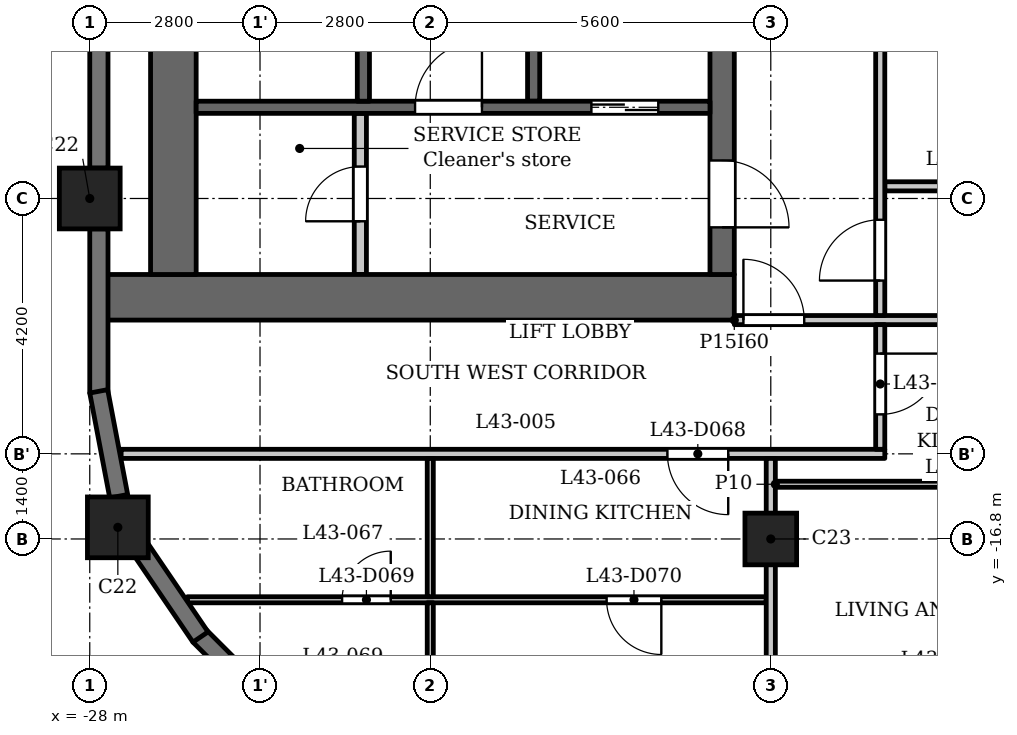
"""IFC4 building model, lengths in metres.
Left out: names, types, materials, properties, quantities, classifications, styles, units other than length and angle.
Written with IfcOpenShell. Run it as: python <this file> out.ifc"""

import sys

from ifc_helpers import new_model, si_unit, direction, frame, frame_2d, origin, origin_2d, place, context, subcontext, project, spatial, rectangle, extrude, element, fill, save


model = new_model("IFC4")
c1 = context("Model", 3, precision=1e-05, world=origin(), true_north=direction((0.0, 1.0)))
c2 = subcontext(c1, "Body", "Model", "MODEL_VIEW")
j1 = project(units=[si_unit("LENGTHUNIT", "METRE"), si_unit("PLANEANGLEUNIT", "RADIAN")], contexts=[c1])
p1 = place(None, origin())
s1 = spatial("IfcSite", under=j1, at=p1, CompositionType="ELEMENT")
p2 = place(p1, origin())
s2 = spatial("IfcBuilding", under=s1, at=p2, CompositionType="ELEMENT")
p3 = place(p2, frame((0.0, 0.0, 167.6)))
s3 = spatial("IfcBuildingStorey", under=s2, at=p3, CompositionType="ELEMENT", Elevation=167.6)
for number, where, z_axis, x_axis in (
    (1, (-28.0, -11.2, 0.0), (0.0, 0.0, 1.0), (1.0, 0.0, 0.0)),
    (2, (-27.538, -16.609, 0.0), (0.0, 0.0, 1.0), (1.0, 0.0, 0.0)),
):
    element("IfcColumn", number, at=place(p3, frame(where, z_axis=z_axis, x_axis=x_axis)), inside=s3, PredefinedType="COLUMN", context=c2, shape_type="SweptSolid", body=[
        extrude(rectangle(XDim=1.0, YDim=1.0, at=origin_2d()), origin(), (0.0, 0.0, 1.0), 3.5),
    ])
p4 = place(p3, frame((-16.8, -16.8, 0.0), z_axis=(0.0, 0.0, 1.0), x_axis=(1.0, 0.0, 0.0)))
e3 = element("IfcColumn", 3, at=p4, inside=s3, PredefinedType="COLUMN", context=c2, shape_type="SweptSolid", body=[
    extrude(rectangle(XDim=0.85, YDim=0.85, at=origin_2d()), origin(), (0.0, 0.0, 1.0), 3.5),
])
p5 = place(p3, frame((-26.197, -18.391, 0.0), z_axis=(0.0, 0.0, 1.0), x_axis=(0.707061571201, -0.707151988282, 0.0)))
e4 = element("IfcWall", 4, at=p5, inside=s3, PredefinedType="SOLIDWALL", context=c2, shape_type="SweptSolid", body=[
    extrude(rectangle(XDim=2.7, YDim=0.3, at=frame_2d((1.35, 0.0))), origin(), (0.0, 0.0, 1.0), 2.45),
])
p6 = place(p5, frame((0.75, 0.0, 0.6)))
e5 = element("IfcOpeningElement", 5, at=p6, cuts=e4, PredefinedType="OPENING", context=c2, shape_type="SweptSolid", body=[
    extrude(rectangle(XDim=1.2, YDim=1.55, at=frame_2d((0.6, 0.775))), frame((0.0, 0.16, 0.0), z_axis=(0.0, -1.0, 0.0), x_axis=(1.0, 0.0, 0.0)), (0.0, 0.0, 1.0), 0.32),
])
p7 = place(p3, frame((-27.85, -6.1, 0.0), z_axis=(0.0, 0.0, 1.0), x_axis=(0.0, -1.0, 0.0)))
e6 = element("IfcWall", 6, at=p7, inside=s3, PredefinedType="SOLIDWALL", context=c2, shape_type="SweptSolid", body=[
    extrude(rectangle(XDim=4.6, YDim=0.3, at=frame_2d((2.3, 0.0))), origin(), (0.0, 0.0, 1.0), 2.45),
])
p8 = place(p3, frame((-27.85, -11.7, 0.0), z_axis=(0.0, 0.0, 1.0), x_axis=(0.0, -1.0, 0.0)))
e7 = element("IfcWall", 7, at=p8, inside=s3, PredefinedType="SOLIDWALL", context=c2, shape_type="SweptSolid", body=[
    extrude(rectangle(XDim=2.7, YDim=0.3, at=frame_2d((1.35, 0.0))), origin(), (0.0, 0.0, 1.0), 2.45),
])
for number, where, z_axis, x_axis in (
    (8, (-27.853, -14.372, 0.0), (0.0, 0.0, 1.0), (0.187, -0.982, 0.0)),
    (9, (-27.166, -16.96, 0.0), (0.0, 0.0, 1.0), (0.562, -0.827, 0.0)),
):
    element("IfcWall", number, at=place(p3, frame(where, z_axis=z_axis, x_axis=x_axis)), inside=s3, PredefinedType="SOLIDWALL", context=c2, shape_type="SweptSolid", body=[
        extrude(rectangle(XDim=1.756, YDim=0.3, at=frame_2d((0.878, 0.0))), origin(), (0.0, 0.0, 1.0), 2.45),
    ])
p9 = place(p3, frame((-20.7, -9.6, 0.0), z_axis=(0.0, 0.0, 1.0), x_axis=(0.0, 1.0, 0.0)))
e10 = element("IfcWall", 10, at=p9, inside=s3, PredefinedType="SHEAR", context=c2, shape_type="SweptSolid", body=[
    extrude(rectangle(XDim=9.75, YDim=0.2, at=frame_2d((4.875, 0.0))), origin(), (0.0, 0.0, 1.0), 3.2),
])
p10 = place(p3, frame((-17.4, -12.825, 0.0), z_axis=(0.0, 0.0, 1.0), x_axis=(-1.0, 0.0, 0.0)))
e11 = element("IfcWall", 11, at=p10, inside=s3, PredefinedType="SHEAR", context=c2, shape_type="SweptSolid", body=[
    extrude(rectangle(XDim=10.4, YDim=0.75, at=frame_2d((5.2, 0.0))), origin(), (0.0, 0.0, 1.0), 3.2),
])
p11 = place(p3, frame((-17.6, -12.45, 0.0), z_axis=(0.0, 0.0, 1.0), x_axis=(0.0, 1.0, 0.0)))
e12 = element("IfcWall", 12, at=p11, inside=s3, PredefinedType="SHEAR", context=c2, shape_type="SweptSolid", body=[
    extrude(rectangle(XDim=24.9, YDim=0.4, at=frame_2d((12.45, 0.0))), origin(), (0.0, 0.0, 1.0), 3.2),
])
p12 = place(p11, frame((8.65, 0.0, 0.0)))
e13 = element("IfcOpeningElement", 13, at=p12, cuts=e12, PredefinedType="OPENING", context=c2, shape_type="SweptSolid", body=[
    extrude(rectangle(XDim=0.9, YDim=2.1, at=frame_2d((0.45, 1.05))), frame((0.0, 0.21, 0.0), z_axis=(0.0, -1.0, 0.0), x_axis=(1.0, 0.0, 0.0)), (0.0, 0.0, 1.0), 0.42),
])
p13 = place(p11, frame((15.6, 0.0, 0.0)))
e14 = element("IfcOpeningElement", 14, at=p13, cuts=e12, PredefinedType="OPENING", context=c2, shape_type="SweptSolid", body=[
    extrude(rectangle(XDim=1.1, YDim=2.1, at=frame_2d((0.55, 1.05))), frame((0.0, 0.21, 0.0), z_axis=(0.0, -1.0, 0.0), x_axis=(1.0, 0.0, 0.0)), (0.0, 0.0, 1.0), 0.42),
])
p14 = place(p11, frame((18.0, 0.0, 0.0)))
e15 = element("IfcOpeningElement", 15, at=p14, cuts=e12, PredefinedType="OPENING", context=c2, shape_type="SweptSolid", body=[
    extrude(rectangle(XDim=1.1, YDim=2.1, at=frame_2d((0.55, 1.05))), frame((0.0, 0.21, 0.0), z_axis=(0.0, -1.0, 0.0), x_axis=(1.0, 0.0, 0.0)), (0.0, 0.0, 1.0), 0.42),
])
p15 = place(p11, frame((23.025, 0.0, 0.0)))
e16 = element("IfcOpeningElement", 16, at=p15, cuts=e12, PredefinedType="OPENING", context=c2, shape_type="SweptSolid", body=[
    extrude(rectangle(XDim=1.1, YDim=2.1, at=frame_2d((0.55, 1.05))), frame((0.0, 0.21, 0.0), z_axis=(0.0, -1.0, 0.0), x_axis=(1.0, 0.0, 0.0)), (0.0, 0.0, 1.0), 0.42),
])
p16 = place(p11, frame((0.775, 0.0, 0.0)))
e17 = element("IfcOpeningElement", 17, at=p16, cuts=e12, PredefinedType="OPENING", context=c2, shape_type="SweptSolid", body=[
    extrude(rectangle(XDim=1.1, YDim=2.1, at=frame_2d((0.55, 1.05))), frame((0.0, 0.21, 0.0), z_axis=(0.0, -1.0, 0.0), x_axis=(1.0, 0.0, 0.0)), (0.0, 0.0, 1.0), 0.42),
])
p17 = place(p11, frame((12.925, 0.0, 0.0)))
e18 = element("IfcOpeningElement", 18, at=p17, cuts=e12, PredefinedType="OPENING", context=c2, shape_type="SweptSolid", body=[
    extrude(rectangle(XDim=1.8, YDim=2.1, at=frame_2d((0.9, 1.05))), frame((0.0, 0.21, 0.0), z_axis=(0.0, -1.0, 0.0), x_axis=(1.0, 0.0, 0.0)), (0.0, 0.0, 1.0), 0.42),
])
p18 = place(p3, frame((-26.625, -12.45, 0.0), z_axis=(0.0, 0.0, 1.0), x_axis=(0.0, 1.0, 0.0)))
e19 = element("IfcWall", 19, at=p18, inside=s3, PredefinedType="SHEAR", context=c2, shape_type="SweptSolid", body=[
    extrude(rectangle(XDim=24.9, YDim=0.75, at=frame_2d((12.45, 0.0))), origin(), (0.0, 0.0, 1.0), 3.2),
])
p19 = place(p3, frame((-23.55, -12.45, 0.0), z_axis=(0.0, 0.0, 1.0), x_axis=(0.0, 1.0, 0.0)))
e20 = element("IfcWall", 20, at=p19, inside=s3, PredefinedType="PARTITIONING", context=c2, shape_type="SweptSolid", body=[
    extrude(rectangle(XDim=2.65, YDim=0.2, at=frame_2d((1.325, 0.0))), origin(), (0.0, 0.0, 1.0), 3.2),
])
p20 = place(p19, frame((0.875, 0.0, 0.0)))
e21 = element("IfcOpeningElement", 21, at=p20, cuts=e20, PredefinedType="OPENING", context=c2, shape_type="SweptSolid", body=[
    extrude(rectangle(XDim=0.9, YDim=2.1, at=frame_2d((0.45, 1.05))), frame((0.0, 0.11, 0.0), z_axis=(0.0, -1.0, 0.0), x_axis=(1.0, 0.0, 0.0)), (0.0, 0.0, 1.0), 0.22),
])
p21 = place(p3, frame((-17.8, -9.7, 0.0), z_axis=(0.0, 0.0, 1.0), x_axis=(-1.0, 0.0, 0.0)))
e22 = element("IfcWall", 22, at=p21, inside=s3, PredefinedType="SHEAR", context=c2, shape_type="SweptSolid", body=[
    extrude(rectangle(XDim=8.45, YDim=0.2, at=frame_2d((4.225, 0.0))), origin(), (0.0, 0.0, 1.0), 3.2),
])
p22 = place(p21, frame((0.85, 0.0, 0.0)))
e23 = element("IfcOpeningElement", 23, at=p22, cuts=e22, PredefinedType="OPENING", context=c2, shape_type="SweptSolid", body=[
    extrude(rectangle(XDim=1.1, YDim=2.1, at=frame_2d((0.55, 1.05))), frame((0.0, 0.11, 0.0), z_axis=(0.0, -1.0, 0.0), x_axis=(1.0, 0.0, 0.0)), (0.0, 0.0, 1.0), 0.22),
])
p23 = place(p21, frame((3.75, 0.0, 0.0)))
e24 = element("IfcOpeningElement", 24, at=p23, cuts=e22, PredefinedType="OPENING", context=c2, shape_type="SweptSolid", body=[
    extrude(rectangle(XDim=1.1, YDim=2.1, at=frame_2d((0.55, 1.05))), frame((0.0, 0.11, 0.0), z_axis=(0.0, -1.0, 0.0), x_axis=(1.0, 0.0, 0.0)), (0.0, 0.0, 1.0), 0.22),
])
p24 = place(p3, frame((-23.5, -9.6, 0.0), z_axis=(0.0, 0.0, 1.0), x_axis=(0.0, 1.0, 0.0)))
e25 = element("IfcWall", 25, at=p24, inside=s3, PredefinedType="SHEAR", context=c2, shape_type="SweptSolid", body=[
    extrude(rectangle(XDim=6.9, YDim=0.2, at=frame_2d((3.45, 0.0))), origin(), (0.0, 0.0, 1.0), 3.2),
])
p25 = place(p3, frame((-26.394, -17.8, 0.0), z_axis=(0.0, 0.0, 1.0), x_axis=(1.0, 0.0, 0.0)))
e26 = element("IfcWall", 26, at=p25, inside=s3, PredefinedType="PARTITIONING", context=c2, shape_type="SweptSolid", body=[
    extrude(rectangle(XDim=9.519, YDim=0.1, at=frame_2d((4.76, 0.0))), origin(), (0.0, 0.0, 1.0), 3.2),
])
p26 = place(p25, frame((2.544, 0.0, 0.0)))
e27 = element("IfcOpeningElement", 27, at=p26, cuts=e26, PredefinedType="OPENING", context=c2, shape_type="SweptSolid", body=[
    extrude(rectangle(XDim=0.8, YDim=2.1, at=frame_2d((0.4, 1.05))), frame((0.0, 0.06, 0.0), z_axis=(0.0, -1.0, 0.0), x_axis=(1.0, 0.0, 0.0)), (0.0, 0.0, 1.0), 0.12),
])
p27 = place(p25, frame((6.894, 0.0, 0.0)))
e28 = element("IfcOpeningElement", 28, at=p27, cuts=e26, PredefinedType="OPENING", context=c2, shape_type="SweptSolid", body=[
    extrude(rectangle(XDim=0.9, YDim=2.1, at=frame_2d((0.45, 1.05))), frame((0.0, 0.06, 0.0), z_axis=(0.0, -1.0, 0.0), x_axis=(1.0, 0.0, 0.0)), (0.0, 0.0, 1.0), 0.12),
])
p28 = place(p3, frame((-16.725, -15.9, 0.0), z_axis=(0.0, 0.0, 1.0), x_axis=(1.0, 0.0, 0.0)))
e29 = element("IfcWall", 29, at=p28, inside=s3, PredefinedType="PARTITIONING", context=c2, shape_type="SweptSolid", body=[
    extrude(rectangle(XDim=33.45, YDim=0.1, at=frame_2d((16.725, 0.0))), origin(), (0.0, 0.0, 1.0), 3.2),
])
p29 = place(p28, frame((9.675, 0.0, 0.0)))
e30 = element("IfcOpeningElement", 30, at=p29, cuts=e29, PredefinedType="OPENING", context=c2, shape_type="SweptSolid", body=[
    extrude(rectangle(XDim=0.8, YDim=2.1, at=frame_2d((0.4, 1.05))), frame((0.0, 0.06, 0.0), z_axis=(0.0, -1.0, 0.0), x_axis=(1.0, 0.0, 0.0)), (0.0, 0.0, 1.0), 0.12),
])
p30 = place(p28, frame((4.075, 0.0, 0.0)))
e31 = element("IfcOpeningElement", 31, at=p30, cuts=e29, PredefinedType="OPENING", context=c2, shape_type="SweptSolid", body=[
    extrude(rectangle(XDim=0.9, YDim=2.1, at=frame_2d((0.45, 1.05))), frame((0.0, 0.06, 0.0), z_axis=(0.0, -1.0, 0.0), x_axis=(1.0, 0.0, 0.0)), (0.0, 0.0, 1.0), 0.12),
])
p31 = place(p28, frame((20.875, 0.0, 0.0)))
e32 = element("IfcOpeningElement", 32, at=p31, cuts=e29, PredefinedType="OPENING", context=c2, shape_type="SweptSolid", body=[
    extrude(rectangle(XDim=0.8, YDim=2.1, at=frame_2d((0.4, 1.05))), frame((0.0, 0.06, 0.0), z_axis=(0.0, -1.0, 0.0), x_axis=(1.0, 0.0, 0.0)), (0.0, 0.0, 1.0), 0.12),
])
p32 = place(p28, frame((15.275, 0.0, 0.0)))
e33 = element("IfcOpeningElement", 33, at=p32, cuts=e29, PredefinedType="OPENING", context=c2, shape_type="SweptSolid", body=[
    extrude(rectangle(XDim=0.9, YDim=2.1, at=frame_2d((0.45, 1.05))), frame((0.0, 0.06, 0.0), z_axis=(0.0, -1.0, 0.0), x_axis=(1.0, 0.0, 0.0)), (0.0, 0.0, 1.0), 0.12),
])
p33 = place(p28, frame((30.825, 0.0, 0.0)))
e34 = element("IfcOpeningElement", 34, at=p33, cuts=e29, PredefinedType="OPENING", context=c2, shape_type="SweptSolid", body=[
    extrude(rectangle(XDim=0.8, YDim=2.1, at=frame_2d((0.4, 1.05))), frame((0.0, 0.06, 0.0), z_axis=(0.0, -1.0, 0.0), x_axis=(1.0, 0.0, 0.0)), (0.0, 0.0, 1.0), 0.12),
])
p34 = place(p28, frame((26.475, 0.0, 0.0)))
e35 = element("IfcOpeningElement", 35, at=p34, cuts=e29, PredefinedType="OPENING", context=c2, shape_type="SweptSolid", body=[
    extrude(rectangle(XDim=0.9, YDim=2.1, at=frame_2d((0.45, 1.05))), frame((0.0, 0.06, 0.0), z_axis=(0.0, -1.0, 0.0), x_axis=(1.0, 0.0, 0.0)), (0.0, 0.0, 1.0), 0.12),
])
p35 = place(p3, frame((-27.484, -15.4, 0.0), z_axis=(0.0, 0.0, 1.0), x_axis=(1.0, 0.0, 0.0)))
e36 = element("IfcWall", 36, at=p35, inside=s3, PredefinedType="PARTITIONING", context=c2, shape_type="SweptSolid", body=[
    extrude(rectangle(XDim=12.559, YDim=0.15, at=frame_2d((6.279, 0.0))), origin(), (0.0, 0.0, 1.0), 3.2),
])
p36 = place(p35, frame((8.984, 0.0, 0.0)))
e37 = element("IfcOpeningElement", 37, at=p36, cuts=e36, PredefinedType="OPENING", context=c2, shape_type="SweptSolid", body=[
    extrude(rectangle(XDim=1.0, YDim=2.1, at=frame_2d((0.5, 1.05))), frame((0.0, 0.085, 0.0), z_axis=(0.0, -1.0, 0.0), x_axis=(1.0, 0.0, 0.0)), (0.0, 0.0, 1.0), 0.17),
])
p37 = place(p3, frame((-17.4, -13.2, 0.0), z_axis=(0.0, 0.0, 1.0), x_axis=(1.0, 0.0, 0.0)))
e38 = element("IfcWall", 38, at=p37, inside=s3, PredefinedType="PARTITIONING", context=c2, shape_type="SweptSolid", body=[
    extrude(rectangle(XDim=34.8, YDim=0.15, at=frame_2d((17.4, 0.0))), origin(), (0.0, 0.0, 1.0), 3.2),
])
p38 = place(p37, frame((0.15, 0.0, 0.0)))
e39 = element("IfcOpeningElement", 39, at=p38, cuts=e38, PredefinedType="OPENING", context=c2, shape_type="SweptSolid", body=[
    extrude(rectangle(XDim=1.0, YDim=2.1, at=frame_2d((0.5, 1.05))), frame((0.0, 0.085, 0.0), z_axis=(0.0, -1.0, 0.0), x_axis=(1.0, 0.0, 0.0)), (0.0, 0.0, 1.0), 0.17),
])
p39 = place(p37, frame((33.55, 0.0, 0.0)))
e40 = element("IfcOpeningElement", 40, at=p39, cuts=e38, PredefinedType="OPENING", context=c2, shape_type="SweptSolid", body=[
    extrude(rectangle(XDim=1.0, YDim=2.1, at=frame_2d((0.5, 1.05))), frame((0.0, 0.085, 0.0), z_axis=(0.0, -1.0, 0.0), x_axis=(1.0, 0.0, 0.0)), (0.0, 0.0, 1.0), 0.17),
])
p40 = place(p37, frame((15.7, 0.0, 0.0)))
e41 = element("IfcOpeningElement", 41, at=p40, cuts=e38, PredefinedType="OPENING", context=c2, shape_type="SweptSolid", body=[
    extrude(rectangle(XDim=1.0, YDim=2.1, at=frame_2d((0.5, 1.05))), frame((0.0, 0.085, 0.0), z_axis=(0.0, -1.0, 0.0), x_axis=(1.0, 0.0, 0.0)), (0.0, 0.0, 1.0), 0.17),
])
p41 = place(p37, frame((26.9, 0.0, 0.0)))
e42 = element("IfcOpeningElement", 42, at=p41, cuts=e38, PredefinedType="OPENING", context=c2, shape_type="SweptSolid", body=[
    extrude(rectangle(XDim=1.0, YDim=2.1, at=frame_2d((0.5, 1.05))), frame((0.0, 0.085, 0.0), z_axis=(0.0, -1.0, 0.0), x_axis=(1.0, 0.0, 0.0)), (0.0, 0.0, 1.0), 0.17),
])
p42 = place(p3, frame((-14.925, -11.0, 0.0), z_axis=(0.0, 0.0, 1.0), x_axis=(1.0, 0.0, 0.0)))
e43 = element("IfcWall", 43, at=p42, inside=s3, PredefinedType="PARTITIONING", context=c2, shape_type="SweptSolid", body=[
    extrude(rectangle(XDim=29.85, YDim=0.15, at=frame_2d((14.925, 0.0))), origin(), (0.0, 0.0, 1.0), 3.2),
])
p43 = place(p42, frame((9.875, 0.0, 0.0)))
e44 = element("IfcOpeningElement", 44, at=p43, cuts=e43, PredefinedType="OPENING", context=c2, shape_type="SweptSolid", body=[
    extrude(rectangle(XDim=1.0, YDim=2.1, at=frame_2d((0.5, 1.05))), frame((0.0, 0.085, 0.0), z_axis=(0.0, -1.0, 0.0), x_axis=(1.0, 0.0, 0.0)), (0.0, 0.0, 1.0), 0.17),
])
p44 = place(p42, frame((17.875, 0.0, 0.0)))
e45 = element("IfcOpeningElement", 45, at=p44, cuts=e43, PredefinedType="OPENING", context=c2, shape_type="SweptSolid", body=[
    extrude(rectangle(XDim=1.0, YDim=2.1, at=frame_2d((0.5, 1.05))), frame((0.0, 0.085, 0.0), z_axis=(0.0, -1.0, 0.0), x_axis=(1.0, 0.0, 0.0)), (0.0, 0.0, 1.0), 0.17),
])
p45 = place(p3, frame((-22.4, -21.72, 0.0), z_axis=(0.0, 0.0, 1.0), x_axis=(0.0, 1.0, 0.0)))
e46 = element("IfcWall", 46, at=p45, inside=s3, PredefinedType="PARTITIONING", context=c2, shape_type="SweptSolid", body=[
    extrude(rectangle(XDim=3.87, YDim=0.1, at=frame_2d((1.935, 0.0))), origin(), (0.0, 0.0, 1.0), 3.2),
])
p46 = place(p45, frame((1.62, 0.0, 0.0)))
e47 = element("IfcOpeningElement", 47, at=p46, cuts=e46, PredefinedType="OPENING", context=c2, shape_type="SweptSolid", body=[
    extrude(rectangle(XDim=0.9, YDim=2.1, at=frame_2d((0.45, 1.05))), frame((0.0, 0.06, 0.0), z_axis=(0.0, -1.0, 0.0), x_axis=(1.0, 0.0, 0.0)), (0.0, 0.0, 1.0), 0.12),
])
p47 = place(p3, frame((-22.4, -17.75, 0.0), z_axis=(0.0, 0.0, 1.0), x_axis=(0.0, 1.0, 0.0)))
e48 = element("IfcWall", 48, at=p47, inside=s3, PredefinedType="PARTITIONING", context=c2, shape_type="SweptSolid", body=[
    extrude(rectangle(XDim=2.275, YDim=0.1, at=frame_2d((1.137, 0.0))), origin(), (0.0, 0.0, 1.0), 3.2),
])
p48 = place(p3, frame((-16.8, -22.88, 0.0), z_axis=(0.0, 0.0, 1.0), x_axis=(0.0, 1.0, 0.0)))
e49 = element("IfcWall", 49, at=p48, inside=s3, PredefinedType="PARTITIONING", context=c2, shape_type="SweptSolid", body=[
    extrude(rectangle(XDim=7.405, YDim=0.15, at=frame_2d((3.702, 0.0))), origin(), (0.0, 0.0, 1.0), 3.2),
])
p49 = place(p3, frame((-15.0, -15.325, 0.0), z_axis=(0.0, 0.0, 1.0), x_axis=(0.0, 1.0, 0.0)))
e50 = element("IfcWall", 50, at=p49, inside=s3, PredefinedType="PARTITIONING", context=c2, shape_type="SweptSolid", body=[
    extrude(rectangle(XDim=2.05, YDim=0.15, at=frame_2d((1.025, 0.0))), origin(), (0.0, 0.0, 1.0), 3.2),
])
p50 = place(p49, frame((0.574, 0.0, 0.0)))
e51 = element("IfcOpeningElement", 51, at=p50, cuts=e50, PredefinedType="OPENING", context=c2, shape_type="SweptSolid", body=[
    extrude(rectangle(XDim=1.0, YDim=2.1, at=frame_2d((0.5, 1.05))), frame((0.0, 0.085, 0.0), z_axis=(0.0, -1.0, 0.0), x_axis=(1.0, 0.0, 0.0)), (0.0, 0.0, 1.0), 0.17),
])
p51 = place(p3, frame((-15.0, -13.125, 0.0), z_axis=(0.0, 0.0, 1.0), x_axis=(0.0, 1.0, 0.0)))
e52 = element("IfcWall", 52, at=p51, inside=s3, PredefinedType="PARTITIONING", context=c2, shape_type="SweptSolid", body=[
    extrude(rectangle(XDim=6.356, YDim=0.15, at=frame_2d((3.178, 0.0))), origin(), (0.0, 0.0, 1.0), 3.2),
])
p52 = place(p51, frame((0.575, 0.0, 0.0)))
e53 = element("IfcOpeningElement", 53, at=p52, cuts=e52, PredefinedType="OPENING", context=c2, shape_type="SweptSolid", body=[
    extrude(rectangle(XDim=1.0, YDim=2.1, at=frame_2d((0.5, 1.05))), frame((0.0, 0.085, 0.0), z_axis=(0.0, -1.0, 0.0), x_axis=(1.0, 0.0, 0.0)), (0.0, 0.0, 1.0), 0.17),
])
p53 = place(p22, origin())
e54 = element("IfcDoor", 54, at=p53, inside=s3, OperationType="DOUBLE_DOOR_SLIDING", PredefinedType="DOOR", context=c2, shape_type="SweptSolid", body=[
    extrude(rectangle(XDim=1.1, YDim=2.1, at=frame_2d((0.55, 1.05))), frame((0.0, 0.025, 0.0), z_axis=(0.0, -1.0, 0.0), x_axis=(1.0, 0.0, 0.0)), (0.0, 0.0, 1.0), 0.05),
])
fill(e23, e54)
p54 = place(p16, origin())
e55 = element("IfcDoor", 55, at=p54, inside=s3, OperationType="SINGLE_SWING_LEFT", PredefinedType="DOOR", context=c2, shape_type="SweptSolid", body=[
    extrude(rectangle(XDim=1.1, YDim=2.1, at=frame_2d((0.55, 1.05))), frame((0.0, 0.025, 0.0), z_axis=(0.0, -1.0, 0.0), x_axis=(1.0, 0.0, 0.0)), (0.0, 0.0, 1.0), 0.05),
])
fill(e17, e55)
p55 = place(p20, origin())
e56 = element("IfcDoor", 56, at=p55, inside=s3, OperationType="SINGLE_SWING_RIGHT", PredefinedType="DOOR", context=c2, shape_type="SweptSolid", body=[
    extrude(rectangle(XDim=0.9, YDim=2.1, at=frame_2d((0.45, 1.05))), frame((0.0, 0.025, 0.0), z_axis=(0.0, -1.0, 0.0), x_axis=(1.0, 0.0, 0.0)), (0.0, 0.0, 1.0), 0.05),
])
fill(e21, e56)
p56 = place(p23, origin())
e57 = element("IfcDoor", 57, at=p56, inside=s3, OperationType="SINGLE_SWING_LEFT", PredefinedType="DOOR", context=c2, shape_type="SweptSolid", body=[
    extrude(rectangle(XDim=1.1, YDim=2.1, at=frame_2d((0.55, 1.05))), frame((0.0, 0.025, 0.0), z_axis=(0.0, -1.0, 0.0), x_axis=(1.0, 0.0, 0.0)), (0.0, 0.0, 1.0), 0.05),
])
fill(e24, e57)
p57 = place(p52, origin())
e58 = element("IfcDoor", 58, at=p57, inside=s3, OperationType="SINGLE_SWING_RIGHT", PredefinedType="DOOR", context=c2, shape_type="SweptSolid", body=[
    extrude(rectangle(XDim=1.0, YDim=2.1, at=frame_2d((0.5, 1.05))), frame((0.0, 0.025, 0.0), z_axis=(0.0, -1.0, 0.0), x_axis=(1.0, 0.0, 0.0)), (0.0, 0.0, 1.0), 0.05),
])
fill(e53, e58)
p58 = place(p38, origin())
e59 = element("IfcDoor", 59, at=p58, inside=s3, OperationType="SINGLE_SWING_RIGHT", PredefinedType="DOOR", context=c2, shape_type="SweptSolid", body=[
    extrude(rectangle(XDim=1.0, YDim=2.1, at=frame_2d((0.5, 1.05))), frame((0.0, 0.025, 0.0), z_axis=(0.0, -1.0, 0.0), x_axis=(1.0, 0.0, 0.0)), (0.0, 0.0, 1.0), 0.05),
])
fill(e39, e59)
p59 = place(p50, origin())
e60 = element("IfcDoor", 60, at=p59, inside=s3, OperationType="SINGLE_SWING_RIGHT", PredefinedType="DOOR", context=c2, shape_type="SweptSolid", body=[
    extrude(rectangle(XDim=1.0, YDim=2.1, at=frame_2d((0.5, 1.05))), frame((0.0, 0.025, 0.0), z_axis=(0.0, -1.0, 0.0), x_axis=(1.0, 0.0, 0.0)), (0.0, 0.0, 1.0), 0.05),
])
fill(e51, e60)
p60 = place(p36, origin())
e61 = element("IfcDoor", 61, at=p60, inside=s3, OperationType="SINGLE_SWING_RIGHT", PredefinedType="DOOR", context=c2, shape_type="SweptSolid", body=[
    extrude(rectangle(XDim=1.0, YDim=2.1, at=frame_2d((0.5, 1.05))), frame((0.0, 0.025, 0.0), z_axis=(0.0, -1.0, 0.0), x_axis=(1.0, 0.0, 0.0)), (0.0, 0.0, 1.0), 0.05),
])
fill(e37, e61)
p61 = place(p26, origin())
e62 = element("IfcDoor", 62, at=p61, inside=s3, OperationType="SINGLE_SWING_LEFT", PredefinedType="DOOR", context=c2, shape_type="SweptSolid", body=[
    extrude(rectangle(XDim=0.8, YDim=2.1, at=frame_2d((0.4, 1.05))), frame((0.0, 0.025, 0.0), z_axis=(0.0, -1.0, 0.0), x_axis=(1.0, 0.0, 0.0)), (0.0, 0.0, 1.0), 0.05),
])
fill(e27, e62)
p62 = place(p27, origin())
e63 = element("IfcDoor", 63, at=p62, inside=s3, OperationType="SINGLE_SWING_RIGHT", PredefinedType="DOOR", context=c2, shape_type="SweptSolid", body=[
    extrude(rectangle(XDim=0.9, YDim=2.1, at=frame_2d((0.45, 1.05))), frame((0.0, 0.025, 0.0), z_axis=(0.0, -1.0, 0.0), x_axis=(1.0, 0.0, 0.0)), (0.0, 0.0, 1.0), 0.05),
])
fill(e28, e63)
save(model, sys.argv[1])
